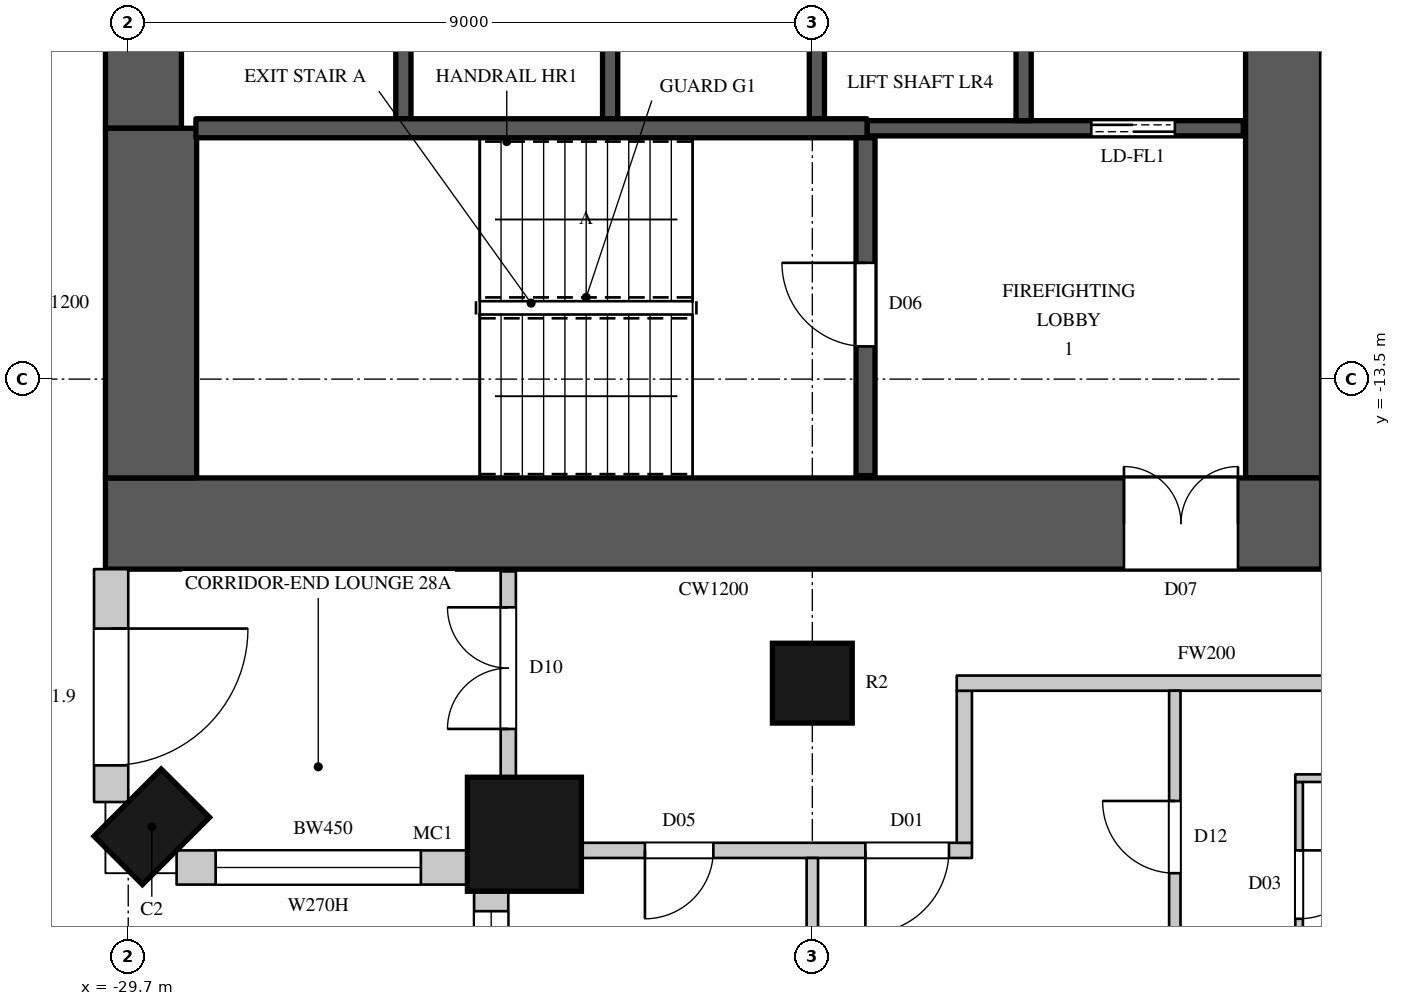
"""IFC4 building model, lengths in metres.
Left out: names, types, materials, properties, quantities, classifications, styles, units other than length and angle.
Written with IfcOpenShell. Run it as: python <this file> out.ifc"""

import sys

from ifc_helpers import new_model, si_unit, direction, frame, frame_2d, origin, origin_2d, place, context, subcontext, project, spatial, rectangle, circle, extrude, element, fill, save


model = new_model("IFC4")
c1 = context("Model", 3, precision=1e-05, world=origin(), true_north=direction((0.0, 1.0)))
c2 = subcontext(c1, "Body", "Model", "MODEL_VIEW")
j1 = project(units=[si_unit("LENGTHUNIT", "METRE"), si_unit("PLANEANGLEUNIT", "RADIAN")], contexts=[c1])
p1 = place(None, origin())
s1 = spatial("IfcSite", under=j1, at=p1, CompositionType="ELEMENT")
p2 = place(p1, origin())
s2 = spatial("IfcBuilding", under=s1, at=p2, CompositionType="ELEMENT")
p3 = place(p2, frame((0.0, 0.0, 131.1)))
s3 = spatial("IfcBuildingStorey", under=s2, at=p3, CompositionType="ELEMENT", Elevation=131.1)
p4 = place(p3, frame((-29.39, -19.39, 0.0), z_axis=(0.0, 0.0, 1.0), x_axis=(0.707106781187, -0.707106781187, 0.0)))
e1 = element("IfcColumn", 1, at=p4, inside=s3, PredefinedType="COLUMN", context=c2, shape_type="SweptSolid", body=[
    extrude(rectangle(XDim=0.9, YDim=1.25, at=origin_2d()), origin(), (0.0, 0.0, 1.0), 3.6),
])
p5 = place(p3, frame((-24.488, -19.488, 0.0), z_axis=(0.0, 0.0, 1.0), x_axis=(1.0, 0.0, 0.0)))
e2 = element("IfcColumn", 2, at=p5, inside=s3, PredefinedType="COLUMN", context=c2, shape_type="SweptSolid", body=[
    extrude(circle(Radius=0.75, at=origin_2d()), origin(), (0.0, 0.0, 1.0), 3.6),
])
p6 = place(p3, frame((-20.7, -17.5, 0.0), z_axis=(0.0, 0.0, 1.0), x_axis=(1.0, 0.0, 0.0)))
e3 = element("IfcColumn", 3, at=p6, inside=s3, PredefinedType="COLUMN", context=c2, shape_type="SweptSolid", body=[
    extrude(circle(Radius=0.525, at=origin_2d()), origin(), (0.0, 0.0, 1.0), 3.6),
])
p7 = place(p3, frame((-29.925, -16.0, 0.0), z_axis=(0.0, 0.0, 1.0), x_axis=(0.0, -1.0, 0.0)))
e4 = element("IfcWall", 4, at=p7, inside=s3, PredefinedType="SOLIDWALL", context=c2, shape_type="SweptSolid", body=[
    extrude(rectangle(XDim=3.064, YDim=0.45, at=frame_2d((1.532, 0.0))), origin(), (0.0, 0.0, 1.0), 3.3),
])
p8 = place(p7, frame((0.782, 0.0, 0.0)))
e5 = element("IfcOpeningElement", 5, at=p8, cuts=e4, PredefinedType="OPENING", context=c2, shape_type="SweptSolid", body=[
    extrude(rectangle(XDim=1.8, YDim=2.4, at=frame_2d((0.9, 1.2))), frame((0.0, 0.235, 0.0), z_axis=(0.0, -1.0, 0.0), x_axis=(1.0, 0.0, 0.0)), (0.0, 0.0, 1.0), 0.47),
])
p9 = place(p3, frame((-29.064, -19.925, 0.0), z_axis=(0.0, 0.0, 1.0), x_axis=(1.0, 0.0, 0.0)))
e6 = element("IfcWall", 6, at=p9, inside=s3, PredefinedType="SOLIDWALL", context=c2, shape_type="SweptSolid", body=[
    extrude(rectangle(XDim=3.857, YDim=0.45, at=frame_2d((1.928, 0.0))), origin(), (0.0, 0.0, 1.0), 3.3),
])
p10 = place(p9, frame((0.514, 0.0, 1.05)))
e7 = element("IfcOpeningElement", 7, at=p10, cuts=e6, PredefinedType="OPENING", context=c2, shape_type="SweptSolid", body=[
    extrude(rectangle(XDim=2.7, YDim=2.0, at=frame_2d((1.35, 1.0))), frame((0.0, 0.235, 0.0), z_axis=(0.0, -1.0, 0.0), x_axis=(1.0, 0.0, 0.0)), (0.0, 0.0, 1.0), 0.47),
])
p11 = place(p3, frame((-24.925, -20.207, 0.0), z_axis=(0.0, 0.0, 1.0), x_axis=(0.0, -1.0, 0.0)))
e8 = element("IfcWall", 8, at=p11, inside=s3, PredefinedType="SOLIDWALL", context=c2, shape_type="SweptSolid", body=[
    extrude(rectangle(XDim=1.843, YDim=0.45, at=frame_2d((0.921, 0.0))), origin(), (0.0, 0.0, 1.0), 3.3),
])
p12 = place(p11, frame((0.293, 0.0, 1.05)))
e9 = element("IfcOpeningElement", 9, at=p12, cuts=e8, PredefinedType="OPENING", context=c2, shape_type="SweptSolid", body=[
    extrude(rectangle(XDim=1.2, YDim=2.0, at=frame_2d((0.6, 1.0))), frame((0.0, 0.235, 0.0), z_axis=(0.0, -1.0, 0.0), x_axis=(1.0, 0.0, 0.0)), (0.0, 0.0, 1.0), 0.47),
])
p13 = place(p3, frame((-30.0, -15.4, 0.0), z_axis=(0.0, 0.0, 1.0), x_axis=(1.0, 0.0, 0.0)))
e10 = element("IfcWall", 10, at=p13, inside=s3, PredefinedType="SHEAR", context=c2, shape_type="SweptSolid", body=[
    extrude(rectangle(XDim=16.0, YDim=1.2, at=frame_2d((8.0, 0.0))), origin(), (0.0, 0.0, 1.0), 3.6),
])
p14 = place(p13, frame((13.4, 0.0, 0.0)))
e11 = element("IfcOpeningElement", 11, at=p14, cuts=e10, PredefinedType="OPENING", context=c2, shape_type="SweptSolid", body=[
    extrude(rectangle(XDim=1.5, YDim=2.4, at=frame_2d((0.75, 1.2))), frame((0.0, 0.61, 0.0), z_axis=(0.0, -1.0, 0.0), x_axis=(1.0, 0.0, 0.0)), (0.0, 0.0, 1.0), 1.22),
])
p15 = place(p3, frame((-14.5, -14.8, 0.0), z_axis=(0.0, 0.0, 1.0), x_axis=(0.0, 1.0, 0.0)))
e12 = element("IfcWall", 12, at=p15, inside=s3, PredefinedType="SHEAR", context=c2, shape_type="SweptSolid", body=[
    extrude(rectangle(XDim=29.6, YDim=1.0, at=frame_2d((14.8, 0.0))), origin(), (0.0, 0.0, 1.0), 3.6),
])
p16 = place(p15, frame((8.45, 0.0, 0.0)))
e13 = element("IfcOpeningElement", 13, at=p16, cuts=e12, PredefinedType="OPENING", context=c2, shape_type="SweptSolid", body=[
    extrude(rectangle(XDim=1.5, YDim=2.4, at=frame_2d((0.75, 1.2))), frame((0.0, 0.51, 0.0), z_axis=(0.0, -1.0, 0.0), x_axis=(1.0, 0.0, 0.0)), (0.0, 0.0, 1.0), 1.02),
])
p17 = place(p15, frame((19.65, 0.0, 0.0)))
e14 = element("IfcOpeningElement", 14, at=p17, cuts=e12, PredefinedType="OPENING", context=c2, shape_type="SweptSolid", body=[
    extrude(rectangle(XDim=1.5, YDim=2.4, at=frame_2d((0.75, 1.2))), frame((0.0, 0.51, 0.0), z_axis=(0.0, -1.0, 0.0), x_axis=(1.0, 0.0, 0.0)), (0.0, 0.0, 1.0), 1.02),
])
p18 = place(p15, frame((14.5, 0.0, 0.0)))
e15 = element("IfcOpeningElement", 15, at=p18, cuts=e12, PredefinedType="OPENING", context=c2, shape_type="SweptSolid", body=[
    extrude(rectangle(XDim=0.6, YDim=2.0, at=frame_2d((0.3, 1.0))), frame((0.0, 0.51, 0.0), z_axis=(0.0, -1.0, 0.0), x_axis=(1.0, 0.0, 0.0)), (0.0, 0.0, 1.0), 1.02),
])
p19 = place(p3, frame((-29.5, -10.2, 0.0), z_axis=(0.0, 0.0, 1.0), x_axis=(0.0, 1.0, 0.0)))
e16 = element("IfcWall", 16, at=p19, inside=s3, PredefinedType="SHEAR", context=c2, shape_type="SweptSolid", body=[
    extrude(rectangle(XDim=20.4, YDim=1.0, at=frame_2d((10.2, 0.0))), origin(), (0.0, 0.0, 1.0), 3.6),
])
p20 = place(p3, frame((-29.4, -14.8, 0.0), z_axis=(0.0, 0.0, 1.0), x_axis=(0.0, 1.0, 0.0)))
e17 = element("IfcWall", 17, at=p20, inside=s3, PredefinedType="SHEAR", context=c2, shape_type="SweptSolid", body=[
    extrude(rectangle(XDim=4.6, YDim=1.2, at=frame_2d((2.3, 0.0))), origin(), (0.0, 0.0, 1.0), 3.6),
])
p21 = place(p3, frame((-24.7, -18.752, 0.0), z_axis=(0.0, 0.0, 1.0), x_axis=(0.0, 1.0, 0.0)))
e18 = element("IfcWall", 18, at=p21, inside=s3, PredefinedType="PARTITIONING", context=c2, shape_type="SweptSolid", body=[
    extrude(rectangle(XDim=2.722, YDim=0.2, at=frame_2d((1.361, 0.0))), origin(), (0.0, 0.0, 1.0), 3.3),
])
p22 = place(p21, frame((0.65, 0.0, 0.0)))
e19 = element("IfcOpeningElement", 19, at=p22, cuts=e18, PredefinedType="OPENING", context=c2, shape_type="SweptSolid", body=[
    extrude(rectangle(XDim=1.6, YDim=2.4, at=frame_2d((0.8, 1.2))), frame((0.0, 0.11, 0.0), z_axis=(0.0, -1.0, 0.0), x_axis=(1.0, 0.0, 0.0)), (0.0, 0.0, 1.0), 0.22),
])
p23 = place(p3, frame((-23.752, -19.7, 0.0), z_axis=(0.0, 0.0, 1.0), x_axis=(1.0, 0.0, 0.0)))
e20 = element("IfcWall", 20, at=p23, inside=s3, PredefinedType="PARTITIONING", context=c2, shape_type="SweptSolid", body=[
    extrude(rectangle(XDim=5.152, YDim=0.2, at=frame_2d((2.576, 0.0))), origin(), (0.0, 0.0, 1.0), 3.3),
])
p24 = place(p23, frame((0.85, 0.0, 0.0)))
e21 = element("IfcOpeningElement", 21, at=p24, cuts=e20, PredefinedType="OPENING", context=c2, shape_type="SweptSolid", body=[
    extrude(rectangle(XDim=0.9, YDim=2.2, at=frame_2d((0.45, 1.1))), frame((0.0, 0.11, 0.0), z_axis=(0.0, -1.0, 0.0), x_axis=(1.0, 0.0, 0.0)), (0.0, 0.0, 1.0), 0.22),
])
p25 = place(p23, frame((3.75, 0.0, 0.0)))
e22 = element("IfcOpeningElement", 22, at=p25, cuts=e20, PredefinedType="OPENING", context=c2, shape_type="SweptSolid", body=[
    extrude(rectangle(XDim=1.1, YDim=2.4, at=frame_2d((0.55, 1.2))), frame((0.0, 0.11, 0.0), z_axis=(0.0, -1.0, 0.0), x_axis=(1.0, 0.0, 0.0)), (0.0, 0.0, 1.0), 0.22),
])
p26 = place(p3, frame((-18.7, -19.6, 0.0), z_axis=(0.0, 0.0, 1.0), x_axis=(0.0, 1.0, 0.0)))
e23 = element("IfcWall", 23, at=p26, inside=s3, PredefinedType="PARTITIONING", context=c2, shape_type="SweptSolid", body=[
    extrude(rectangle(XDim=2.0, YDim=0.2, at=frame_2d((1.0, 0.0))), origin(), (0.0, 0.0, 1.0), 3.3),
])
p27 = place(p3, frame((-18.8, -17.5, 0.0), z_axis=(0.0, 0.0, 1.0), x_axis=(1.0, 0.0, 0.0)))
e24 = element("IfcWall", 24, at=p27, inside=s3, PredefinedType="PARTITIONING", context=c2, shape_type="SweptSolid", body=[
    extrude(rectangle(XDim=6.575, YDim=0.2, at=frame_2d((3.288, 0.0))), origin(), (0.0, 0.0, 1.0), 2.75),
])
p28 = place(p3, frame((-20.7, -24.9, 0.0), z_axis=(0.0, 0.0, 1.0), x_axis=(0.0, 1.0, 0.0)))
e25 = element("IfcWall", 25, at=p28, inside=s3, PredefinedType="PARTITIONING", context=c2, shape_type="SweptSolid", body=[
    extrude(rectangle(XDim=5.1, YDim=0.15, at=frame_2d((2.55, 0.0))), origin(), (0.0, 0.0, 1.0), 2.75),
])
p29 = place(p3, frame((-15.931, -25.7, 0.0), z_axis=(0.0, 0.0, 1.0), x_axis=(0.0, 1.0, 0.0)))
e26 = element("IfcWall", 26, at=p29, inside=s3, PredefinedType="PARTITIONING", context=c2, shape_type="SweptSolid", body=[
    extrude(rectangle(XDim=8.1, YDim=0.15, at=frame_2d((4.05, 0.0))), origin(), (0.0, 0.0, 1.0), 3.3),
])
p30 = place(p29, frame((5.7, 0.0, 0.0)))
e27 = element("IfcOpeningElement", 27, at=p30, cuts=e26, PredefinedType="OPENING", context=c2, shape_type="SweptSolid", body=[
    extrude(rectangle(XDim=0.95, YDim=2.2, at=frame_2d((0.475, 1.1))), frame((0.0, 0.085, 0.0), z_axis=(0.0, -1.0, 0.0), x_axis=(1.0, 0.0, 0.0)), (0.0, 0.0, 1.0), 0.17),
])
for number, where, z_axis, x_axis in (
    (28, (-26.08, -10.075, 0.0), (0.0, 0.0, 1.0), (0.0, 1.0, 0.0)),
    (29, (-23.36, -10.075, 0.0), (0.0, 0.0, 1.0), (0.0, 1.0, 0.0)),
    (30, (-20.64, -10.075, 0.0), (0.0, 0.0, 1.0), (0.0, 1.0, 0.0)),
):
    element("IfcWall", number, at=place(p3, frame(where, z_axis=z_axis, x_axis=x_axis)), inside=s3, PredefinedType="SHEAR", context=c2, shape_type="SweptSolid", body=[
        extrude(rectangle(XDim=2.575, YDim=0.2, at=frame_2d((1.288, 0.0))), origin(), (0.0, 0.0, 1.0), 3.6),
    ])
p31 = place(p3, frame((-19.98, -10.2, 0.0), z_axis=(0.0, 0.0, 1.0), x_axis=(1.0, 0.0, 0.0)))
e31 = element("IfcWall", 31, at=p31, inside=s3, PredefinedType="SHEAR", context=c2, shape_type="SweptSolid", body=[
    extrude(rectangle(XDim=4.95, YDim=0.2, at=frame_2d((2.475, 0.0))), origin(), (0.0, 0.0, 1.0), 3.3),
])
p32 = place(p31, frame((2.95, 0.0, 0.0)))
e32 = element("IfcOpeningElement", 32, at=p32, cuts=e31, PredefinedType="OPENING", context=c2, shape_type="SweptSolid", body=[
    extrude(rectangle(XDim=1.1, YDim=2.2, at=frame_2d((0.55, 1.1))), frame((0.0, 0.11, 0.0), z_axis=(0.0, -1.0, 0.0), x_axis=(1.0, 0.0, 0.0)), (0.0, 0.0, 1.0), 0.22),
])
p33 = place(p3, frame((-17.92, -10.1, 0.0), z_axis=(0.0, 0.0, 1.0), x_axis=(0.0, 1.0, 0.0)))
e33 = element("IfcWall", 33, at=p33, inside=s3, PredefinedType="SHEAR", context=c2, shape_type="SweptSolid", body=[
    extrude(rectangle(XDim=2.6, YDim=0.2, at=frame_2d((1.3, 0.0))), origin(), (0.0, 0.0, 1.0), 3.6),
])
p34 = place(p3, frame((-28.81, -10.2, 0.0), z_axis=(0.0, 0.0, 1.0), x_axis=(1.0, 0.0, 0.0)))
e34 = element("IfcWall", 34, at=p34, inside=s3, PredefinedType="SHEAR", context=c2, shape_type="SweptSolid", body=[
    extrude(rectangle(XDim=8.83, YDim=0.25, at=frame_2d((4.415, 0.0))), origin(), (0.0, 0.0, 1.0), 3.3),
])
p35 = place(p3, frame((-20.0, -14.77, 0.0), z_axis=(0.0, 0.0, 1.0), x_axis=(0.0, 1.0, 0.0)))
e35 = element("IfcWall", 35, at=p35, inside=s3, PredefinedType="SHEAR", context=c2, shape_type="SweptSolid", body=[
    extrude(rectangle(XDim=4.445, YDim=0.25, at=frame_2d((2.223, 0.0))), origin(), (0.0, 0.0, 1.0), 3.3),
])
p36 = place(p35, frame((1.7, 0.0, 0.0)))
e36 = element("IfcOpeningElement", 36, at=p36, cuts=e35, PredefinedType="OPENING", context=c2, shape_type="SweptSolid", body=[
    extrude(rectangle(XDim=1.1, YDim=2.2, at=frame_2d((0.55, 1.1))), frame((0.0, 0.135, 0.0), z_axis=(0.0, -1.0, 0.0), x_axis=(1.0, 0.0, 0.0)), (0.0, 0.0, 1.0), 0.27),
])
p37 = place(p3, frame((-14.296, -21.5, 0.0), z_axis=(0.0, 0.0, 1.0), x_axis=(0.0, 1.0, 0.0)))
e37 = element("IfcWall", 37, at=p37, inside=s3, PredefinedType="PARTITIONING", context=c2, shape_type="SweptSolid", body=[
    extrude(rectangle(XDim=2.7, YDim=0.1, at=frame_2d((1.35, 0.0))), origin(), (0.0, 0.0, 1.0), 3.3),
])
p38 = place(p37, frame((0.9, 0.0, 0.0)))
e38 = element("IfcOpeningElement", 38, at=p38, cuts=e37, PredefinedType="OPENING", context=c2, shape_type="SweptSolid", body=[
    extrude(rectangle(XDim=0.9, YDim=2.2, at=frame_2d((0.45, 1.1))), frame((0.0, 0.06, 0.0), z_axis=(0.0, -1.0, 0.0), x_axis=(1.0, 0.0, 0.0)), (0.0, 0.0, 1.0), 0.12),
])
p39 = place(p3, frame((-14.346, -18.75, 0.0), z_axis=(0.0, 0.0, 1.0), x_axis=(1.0, 0.0, 0.0)))
e39 = element("IfcWall", 39, at=p39, inside=s3, PredefinedType="PARTITIONING", context=c2, shape_type="SweptSolid", body=[
    extrude(rectangle(XDim=2.546, YDim=0.1, at=frame_2d((1.273, 0.0))), origin(), (0.0, 0.0, 1.0), 3.3),
])
p40 = place(p8, origin())
e40 = element("IfcDoor", 40, at=p40, inside=s3, OperationType="SLIDING_TO_LEFT", PredefinedType="DOOR", context=c2, shape_type="SweptSolid", body=[
    extrude(rectangle(XDim=1.8, YDim=2.4, at=frame_2d((0.9, 1.2))), frame((0.0, 0.13, 0.0), z_axis=(0.0, -1.0, 0.0), x_axis=(1.0, 0.0, 0.0)), (0.0, 0.0, 1.0), 0.05),
])
fill(e5, e40)
p41 = place(p10, origin())
e41 = element("IfcWindow", 41, at=p41, inside=s3, PartitioningType="SINGLE_PANEL", PredefinedType="WINDOW", context=c2, shape_type="SweptSolid", body=[
    extrude(rectangle(XDim=2.7, YDim=2.0, at=frame_2d((1.35, 1.0))), frame((0.0, 0.135, 0.0), z_axis=(0.0, -1.0, 0.0), x_axis=(1.0, 0.0, 0.0)), (0.0, 0.0, 1.0), 0.06),
])
fill(e7, e41)
p42 = place(p12, origin())
e42 = element("IfcWindow", 42, at=p42, inside=s3, PartitioningType="SINGLE_PANEL", PredefinedType="WINDOW", context=c2, shape_type="SweptSolid", body=[
    extrude(rectangle(XDim=1.2, YDim=2.0, at=frame_2d((0.6, 1.0))), frame((0.0, 0.135, 0.0), z_axis=(0.0, -1.0, 0.0), x_axis=(1.0, 0.0, 0.0)), (0.0, 0.0, 1.0), 0.06),
])
fill(e9, e42)
p43 = place(p36, origin())
e43 = element("IfcDoor", 43, at=p43, inside=s3, OperationType="SINGLE_SWING_RIGHT", PredefinedType="DOOR", context=c2, shape_type="SweptSolid", body=[
    extrude(rectangle(XDim=1.1, YDim=2.2, at=frame_2d((0.55, 1.1))), frame((0.0, 0.025, 0.0), z_axis=(0.0, -1.0, 0.0), x_axis=(1.0, 0.0, 0.0)), (0.0, 0.0, 1.0), 0.05),
])
fill(e36, e43)
p44 = place(p32, origin())
e44 = element("IfcDoor", 44, at=p44, inside=s3, OperationType="DOUBLE_DOOR_SLIDING", PredefinedType="DOOR", context=c2, shape_type="SweptSolid", body=[
    extrude(rectangle(XDim=1.1, YDim=2.2, at=frame_2d((0.55, 1.1))), frame((0.0, 0.025, 0.0), z_axis=(0.0, -1.0, 0.0), x_axis=(1.0, 0.0, 0.0)), (0.0, 0.0, 1.0), 0.05),
])
fill(e32, e44)
p45 = place(p24, origin())
e45 = element("IfcDoor", 45, at=p45, inside=s3, OperationType="SINGLE_SWING_RIGHT", PredefinedType="DOOR", context=c2, shape_type="SweptSolid", body=[
    extrude(rectangle(XDim=0.9, YDim=2.2, at=frame_2d((0.45, 1.1))), frame((0.0, 0.025, 0.0), z_axis=(0.0, -1.0, 0.0), x_axis=(1.0, 0.0, 0.0)), (0.0, 0.0, 1.0), 0.05),
])
fill(e21, e45)
p46 = place(p22, origin())
e46 = element("IfcDoor", 46, at=p46, inside=s3, OperationType="DOUBLE_DOOR_SINGLE_SWING", PredefinedType="DOOR", context=c2, shape_type="SweptSolid", body=[
    extrude(rectangle(XDim=1.6, YDim=2.4, at=frame_2d((0.8, 1.2))), frame((0.0, 0.025, 0.0), z_axis=(0.0, -1.0, 0.0), x_axis=(1.0, 0.0, 0.0)), (0.0, 0.0, 1.0), 0.05),
])
fill(e19, e46)
p47 = place(p25, origin())
e47 = element("IfcDoor", 47, at=p47, inside=s3, OperationType="SINGLE_SWING_RIGHT", PredefinedType="DOOR", context=c2, shape_type="SweptSolid", body=[
    extrude(rectangle(XDim=1.1, YDim=2.4, at=frame_2d((0.55, 1.2))), frame((0.0, 0.025, 0.0), z_axis=(0.0, -1.0, 0.0), x_axis=(1.0, 0.0, 0.0)), (0.0, 0.0, 1.0), 0.05),
])
fill(e22, e47)
p48 = place(p30, origin())
e48 = element("IfcDoor", 48, at=p48, inside=s3, OperationType="SINGLE_SWING_RIGHT", PredefinedType="DOOR", context=c2, shape_type="SweptSolid", body=[
    extrude(rectangle(XDim=0.95, YDim=2.2, at=frame_2d((0.475, 1.1))), frame((0.0, 0.025, 0.0), z_axis=(0.0, -1.0, 0.0), x_axis=(1.0, 0.0, 0.0)), (0.0, 0.0, 1.0), 0.05),
])
fill(e27, e48)
p49 = place(p38, origin())
e49 = element("IfcDoor", 49, at=p49, inside=s3, OperationType="SINGLE_SWING_LEFT", PredefinedType="DOOR", context=c2, shape_type="SweptSolid", body=[
    extrude(rectangle(XDim=0.9, YDim=2.2, at=frame_2d((0.45, 1.1))), frame((0.0, 0.025, 0.0), z_axis=(0.0, -1.0, 0.0), x_axis=(1.0, 0.0, 0.0)), (0.0, 0.0, 1.0), 0.05),
])
fill(e38, e49)
p50 = place(p14, origin())
e50 = element("IfcDoor", 50, at=p50, inside=s3, OperationType="DOUBLE_DOOR_SINGLE_SWING", PredefinedType="DOOR", context=c2, shape_type="SweptSolid", body=[
    extrude(rectangle(XDim=1.5, YDim=2.4, at=frame_2d((0.75, 1.2))), frame((0.0, 0.025, 0.0), z_axis=(0.0, -1.0, 0.0), x_axis=(1.0, 0.0, 0.0)), (0.0, 0.0, 1.0), 0.05),
])
fill(e11, e50)
save(model, sys.argv[1])
